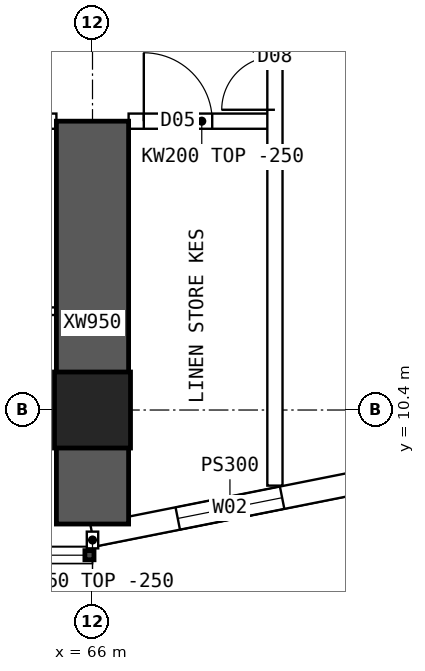
"""IFC4 building model, lengths in metres.
Left out: names, types, materials, properties, quantities, classifications, styles, units other than length and angle.
Written with IfcOpenShell. Run it as: python <this file> out.ifc"""

import sys

from ifc_helpers import new_model, si_unit, direction, frame, frame_2d, origin, origin_2d, place, context, subcontext, project, spatial, polyline, rectangle, hollow_rectangle, outline, extrude, element, fill, save


model = new_model("IFC4")
c1 = context("Model", 3, precision=1e-05, world=origin(), true_north=direction((0.0, 1.0)))
c2 = subcontext(c1, "Body", "Model", "MODEL_VIEW")
j1 = project(units=[si_unit("LENGTHUNIT", "METRE"), si_unit("PLANEANGLEUNIT", "RADIAN")], contexts=[c1])
p1 = place(None, origin())
s1 = spatial("IfcSite", under=j1, at=p1, CompositionType="ELEMENT")
p2 = place(p1, origin())
s2 = spatial("IfcBuilding", under=s1, at=p2, CompositionType="ELEMENT")
p3 = place(p2, frame((0.0, 0.0, 88.15)))
s3 = spatial("IfcBuildingStorey", under=s2, at=p3, CompositionType="ELEMENT", Elevation=88.15)
p4 = place(p3, frame((66.0, 10.4, 0.0), z_axis=(0.0, 0.0, 1.0), x_axis=(1.0, 0.0, 0.0)))
e1 = element("IfcColumn", 1, at=p4, inside=s3, PredefinedType="COLUMN", context=c2, shape_type="SweptSolid", body=[
    extrude(hollow_rectangle(XDim=1.0, YDim=1.0, WallThickness=0.1, at=origin_2d()), origin(), (0.0, 0.0, 1.0), 3.75),
])
p5 = place(p3, frame((66.0, 8.9, 0.0), z_axis=(0.0, 0.0, 1.0), x_axis=(0.0, 1.0, 0.0)))
e2 = element("IfcWall", 2, at=p5, inside=s3, PredefinedType="SHEAR", context=c2, shape_type="SweptSolid", body=[
    extrude(rectangle(XDim=5.3, YDim=0.95, at=frame_2d((2.65, 0.0))), origin(), (0.0, 0.0, 1.0), 3.75),
])
p6 = place(p3, frame((66.0, 8.75, 0.0), z_axis=(0.0, 0.0, 1.0), x_axis=(0.980791473772, 0.195059183267, 0.0)))
e3 = element("IfcWall", 3, at=p6, inside=s3, PredefinedType="SOLIDWALL", context=c2, shape_type="SweptSolid", body=[
    extrude(outline(polyline([(-0.03, -0.15), (3.717, -0.15), (3.657, 0.15), (0.03, 0.15), (-0.03, -0.15)])), origin(), (0.0, 0.0, 1.0), 3.5),
])
p7 = place(p6, frame((1.144, 0.0, 0.9)))
e4 = element("IfcOpeningElement", 4, at=p7, cuts=e3, PredefinedType="OPENING", context=c2, shape_type="SweptSolid", body=[
    extrude(rectangle(XDim=1.4, YDim=1.8, at=frame_2d((0.7, 0.9))), frame((0.0, 0.16, 0.0), z_axis=(0.0, -1.0, 0.0), x_axis=(1.0, 0.0, 0.0)), (0.0, 0.0, 1.0), 0.32),
])
p8 = place(p3, frame((60.475, 14.2, 0.0), z_axis=(0.0, 0.0, 1.0), x_axis=(1.0, 0.0, 0.0)))
e5 = element("IfcWall", 5, at=p8, inside=s3, PredefinedType="SOLIDWALL", context=c2, shape_type="SweptSolid", body=[
    extrude(outline(polyline([(0.0, 0.0), (5.05, 0.0), (5.05, 3.1), (0.0, 3.1), (0.0, 0.0)])), frame((0.0, 0.1, 0.0), z_axis=(0.0, -1.0, 0.0), x_axis=(1.0, 0.0, 0.0)), (0.0, 0.0, 1.0), 0.2),
])
p9 = place(p8, frame((1.45, 0.0, 0.0)))
e6 = element("IfcOpeningElement", 6, at=p9, cuts=e5, PredefinedType="OPENING", context=c2, shape_type="SweptSolid", body=[
    extrude(rectangle(XDim=0.9, YDim=2.1, at=frame_2d((0.45, 1.05))), frame((0.0, 0.11, 0.0), z_axis=(0.0, -1.0, 0.0), x_axis=(1.0, 0.0, 0.0)), (0.0, 0.0, 1.0), 0.22),
])
p10 = place(p8, frame((2.7, 0.0, 0.0)))
e7 = element("IfcOpeningElement", 7, at=p10, cuts=e5, PredefinedType="OPENING", context=c2, shape_type="SweptSolid", body=[
    extrude(rectangle(XDim=0.9, YDim=2.1, at=frame_2d((0.45, 1.05))), frame((0.0, 0.11, 0.0), z_axis=(0.0, -1.0, 0.0), x_axis=(1.0, 0.0, 0.0)), (0.0, 0.0, 1.0), 0.22),
])
p11 = place(p3, frame((66.475, 14.2, 0.0), z_axis=(0.0, 0.0, 1.0), x_axis=(1.0, 0.0, 0.0)))
e8 = element("IfcWall", 8, at=p11, inside=s3, PredefinedType="SOLIDWALL", context=c2, shape_type="SweptSolid", body=[
    extrude(rectangle(XDim=1.925, YDim=0.2, at=frame_2d((0.962, 0.0))), origin(), (0.0, 0.0, 1.0), 3.5),
])
p12 = place(p11, frame((0.2, 0.0, 0.0)))
e9 = element("IfcOpeningElement", 9, at=p12, cuts=e8, PredefinedType="OPENING", context=c2, shape_type="SweptSolid", body=[
    extrude(rectangle(XDim=0.9, YDim=2.1, at=frame_2d((0.45, 1.05))), frame((0.0, 0.11, 0.0), z_axis=(0.0, -1.0, 0.0), x_axis=(1.0, 0.0, 0.0)), (0.0, 0.0, 1.0), 0.22),
])
p13 = place(p3, frame((65.525, 11.7, 0.0), z_axis=(0.0, 0.0, 1.0), x_axis=(-1.0, 0.0, 0.0)))
e10 = element("IfcWall", 10, at=p13, inside=s3, PredefinedType="PARTITIONING", context=c2, shape_type="SweptSolid", body=[
    extrude(rectangle(XDim=1.4, YDim=0.1, at=frame_2d((0.7, 0.0))), origin(), (0.0, 0.0, 1.0), 3.5),
])
p14 = place(p13, frame((0.25, 0.0, 0.0)))
e11 = element("IfcOpeningElement", 11, at=p14, cuts=e10, PredefinedType="OPENING", context=c2, shape_type="SweptSolid", body=[
    extrude(rectangle(XDim=0.9, YDim=2.1, at=frame_2d((0.45, 1.05))), frame((0.0, 0.06, 0.0), z_axis=(0.0, -1.0, 0.0), x_axis=(1.0, 0.0, 0.0)), (0.0, 0.0, 1.0), 0.12),
])
p15 = place(p3, frame((68.4, 9.405, 0.0), z_axis=(0.0, 0.0, 1.0), x_axis=(0.0, 1.0, 0.0)))
e12 = element("IfcWall", 12, at=p15, inside=s3, PredefinedType="SOLIDWALL", context=c2, shape_type="SweptSolid", body=[
    extrude(rectangle(XDim=45.189, YDim=0.2, at=frame_2d((22.595, 0.0))), origin(), (0.0, 0.0, 1.0), 3.5),
])
p16 = place(p15, frame((30.195, 0.0, 0.0)))
e13 = element("IfcOpeningElement", 13, at=p16, cuts=e12, PredefinedType="OPENING", context=c2, shape_type="SweptSolid", body=[
    extrude(rectangle(XDim=1.2, YDim=2.1, at=frame_2d((0.6, 1.05))), frame((0.0, 0.11, 0.0), z_axis=(0.0, -1.0, 0.0), x_axis=(1.0, 0.0, 0.0)), (0.0, 0.0, 1.0), 0.22),
])
p17 = place(p15, frame((4.945, 0.0, 0.0)))
e14 = element("IfcOpeningElement", 14, at=p17, cuts=e12, PredefinedType="OPENING", context=c2, shape_type="SweptSolid", body=[
    extrude(rectangle(XDim=1.4, YDim=2.1, at=frame_2d((0.7, 1.05))), frame((0.0, 0.11, 0.0), z_axis=(0.0, -1.0, 0.0), x_axis=(1.0, 0.0, 0.0)), (0.0, 0.0, 1.0), 0.22),
])
p18 = place(p15, frame((38.745, 0.0, 0.0)))
e15 = element("IfcOpeningElement", 15, at=p18, cuts=e12, PredefinedType="OPENING", context=c2, shape_type="SweptSolid", body=[
    extrude(rectangle(XDim=1.4, YDim=2.1, at=frame_2d((0.7, 1.05))), frame((0.0, 0.11, 0.0), z_axis=(0.0, -1.0, 0.0), x_axis=(1.0, 0.0, 0.0)), (0.0, 0.0, 1.0), 0.22),
])
p19 = place(p3, frame((66.0, 8.8, 0.0), z_axis=(0.0, 0.0, 1.0), x_axis=(0.0, -1.0, 0.0)))
e16 = element("IfcWall", 16, at=p19, inside=s3, PredefinedType="PARTITIONING", context=c2, shape_type="SweptSolid", body=[
    extrude(rectangle(XDim=0.22, YDim=0.15, at=frame_2d((0.11, 0.0))), origin(), (0.0, 0.0, 1.0), 3.5),
])
p20 = place(p7, origin())
e17 = element("IfcWindow", 17, at=p20, inside=s3, PartitioningType="SINGLE_PANEL", PredefinedType="WINDOW", context=c2, shape_type="SweptSolid", body=[
    extrude(rectangle(XDim=1.4, YDim=1.8, at=frame_2d((0.7, 0.9))), frame((0.0, 0.03, 0.0), z_axis=(0.0, -1.0, 0.0), x_axis=(1.0, 0.0, 0.0)), (0.0, 0.0, 1.0), 0.06),
])
fill(e4, e17)
p21 = place(p17, origin())
e18 = element("IfcDoor", 18, at=p21, inside=s3, OperationType="DOUBLE_DOOR_SINGLE_SWING", PredefinedType="DOOR", context=c2, shape_type="SweptSolid", body=[
    extrude(rectangle(XDim=1.4, YDim=2.1, at=frame_2d((0.7, 1.05))), frame((0.0, 0.025, 0.0), z_axis=(0.0, -1.0, 0.0), x_axis=(1.0, 0.0, 0.0)), (0.0, 0.0, 1.0), 0.05),
])
fill(e14, e18)
p22 = place(p12, origin())
e19 = element("IfcDoor", 19, at=p22, inside=s3, OperationType="SINGLE_SWING_LEFT", PredefinedType="DOOR", context=c2, shape_type="SweptSolid", body=[
    extrude(rectangle(XDim=0.9, YDim=2.1, at=frame_2d((0.45, 1.05))), frame((0.0, 0.025, 0.0), z_axis=(0.0, -1.0, 0.0), x_axis=(1.0, 0.0, 0.0)), (0.0, 0.0, 1.0), 0.05),
])
fill(e9, e19)
save(model, sys.argv[1])
